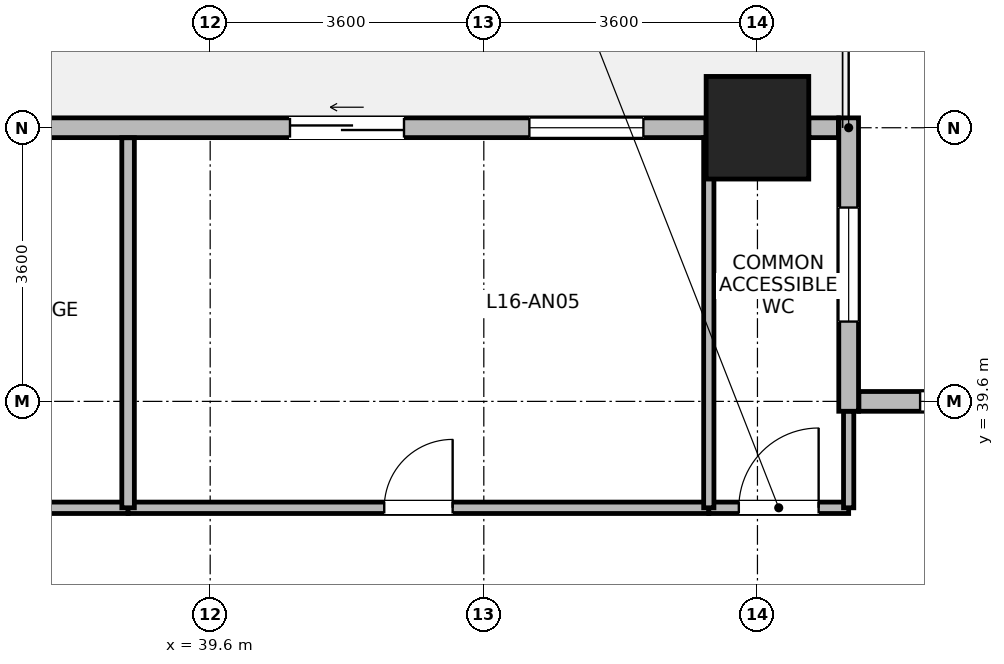
"""IFC4 building model, lengths in metres.
Left out: names, types, materials, properties, quantities, classifications, styles, units other than length and angle.
Written with IfcOpenShell. Run it as: python <this file> out.ifc"""

import sys

from ifc_helpers import new_model, si_unit, direction, frame, frame_2d, origin, origin_2d, place, context, subcontext, project, spatial, rectangle, extrude, source, transform, mapped, element, fill, save


model = new_model("IFC4")
c1 = context("Model", 3, precision=1e-05, world=origin(), true_north=direction((0.0, 1.0)))
c2 = subcontext(c1, "Body", "Model", "MODEL_VIEW")
j1 = project(units=[si_unit("LENGTHUNIT", "METRE"), si_unit("PLANEANGLEUNIT", "RADIAN")], contexts=[c1])
p1 = place(None, origin())
s1 = spatial("IfcSite", under=j1, at=p1, CompositionType="ELEMENT")
p2 = place(p1, origin())
s2 = spatial("IfcBuilding", under=s1, at=p2, CompositionType="ELEMENT")
p3 = place(p2, frame((0.0, 0.0, 66.0)))
s3 = spatial("IfcBuildingStorey", under=s2, at=p3, CompositionType="ELEMENT", Elevation=66.0)
m1 = source(origin(), c2, "Body", "SweptSolid", [
    extrude(rectangle(XDim=1.35, YDim=1.35, at=origin_2d()), origin(), (0.0, 0.0, 1.0), 3.7),
])
p4 = place(p3, frame((46.8, 43.2, 0.0), z_axis=(0.0, 0.0, 1.0), x_axis=(1.0, 0.0, 0.0)))
e1 = element("IfcColumn", 1, at=p4, inside=s3, PredefinedType="COLUMN", context=c2, shape_type="MappedRepresentation", body=[
    mapped(m1, transform((0.0, 0.0, 0.0), x_axis=(1.0, 0.0, 0.0), y_axis=(0.0, 1.0, 0.0), z_axis=(0.0, 0.0, 1.0), scale=1.0)),
])
p5 = place(p3, frame((48.135, 39.6, 0.0), z_axis=(0.0, 0.0, 1.0), x_axis=(1.0, 0.0, 0.0)))
e2 = element("IfcWall", 2, at=p5, inside=s3, PredefinedType="STANDARD", context=c2, shape_type="SweptSolid", body=[
    extrude(rectangle(XDim=9.33, YDim=0.26, at=frame_2d((4.665, 0.0))), origin(), (0.0, 0.0, 1.0), 3.43),
])
p6 = place(p5, frame((0.805, 0.0, 0.85)))
e3 = element("IfcOpeningElement", 3, at=p6, cuts=e2, PredefinedType="OPENING", context=c2, shape_type="SweptSolid", body=[
    extrude(rectangle(XDim=1.5, YDim=1.85, at=frame_2d((0.75, 0.925))), frame((0.0, 0.14, 0.0), z_axis=(0.0, -1.0, 0.0), x_axis=(1.0, 0.0, 0.0)), (0.0, 0.0, 1.0), 0.28),
])
p7 = place(p5, frame((3.915, 0.0, 0.85)))
e4 = element("IfcOpeningElement", 4, at=p7, cuts=e2, PredefinedType="OPENING", context=c2, shape_type="SweptSolid", body=[
    extrude(rectangle(XDim=1.5, YDim=1.85, at=frame_2d((0.75, 0.925))), frame((0.0, 0.14, 0.0), z_axis=(0.0, -1.0, 0.0), x_axis=(1.0, 0.0, 0.0)), (0.0, 0.0, 1.0), 0.28),
])
p8 = place(p5, frame((7.025, 0.0, 0.85)))
e5 = element("IfcOpeningElement", 5, at=p8, cuts=e2, PredefinedType="OPENING", context=c2, shape_type="SweptSolid", body=[
    extrude(rectangle(XDim=1.5, YDim=1.85, at=frame_2d((0.75, 0.925))), frame((0.0, 0.14, 0.0), z_axis=(0.0, -1.0, 0.0), x_axis=(1.0, 0.0, 0.0)), (0.0, 0.0, 1.0), 0.28),
])
p9 = place(p3, frame((48.0, 43.33, 0.0), z_axis=(0.0, 0.0, 1.0), x_axis=(0.0, -1.0, 0.0)))
e6 = element("IfcWall", 6, at=p9, inside=s3, PredefinedType="STANDARD", context=c2, shape_type="SweptSolid", body=[
    extrude(rectangle(XDim=3.86, YDim=0.26, at=frame_2d((1.93, 0.0))), origin(), (0.0, 0.0, 1.0), 3.43),
])
p10 = place(p9, frame((1.18, 0.0, 0.85)))
e7 = element("IfcOpeningElement", 7, at=p10, cuts=e6, PredefinedType="OPENING", context=c2, shape_type="SweptSolid", body=[
    extrude(rectangle(XDim=1.5, YDim=1.85, at=frame_2d((0.75, 0.925))), frame((0.0, 0.14, 0.0), z_axis=(0.0, -1.0, 0.0), x_axis=(1.0, 0.0, 0.0)), (0.0, 0.0, 1.0), 0.28),
])
p11 = place(p3, frame((47.476, 43.2, 0.0), z_axis=(0.0, 0.0, 1.0), x_axis=(1.0, 0.0, 0.0)))
e8 = element("IfcWall", 8, at=p11, inside=s3, PredefinedType="STANDARD", context=c2, shape_type="SweptSolid", body=[
    extrude(rectangle(XDim=0.389, YDim=0.26, at=frame_2d((0.194, 0.0))), origin(), (0.0, 0.0, 1.0), 3.43),
])
p12 = place(p3, frame((36.676, 43.2, 0.0), z_axis=(0.0, 0.0, 1.0), x_axis=(1.0, 0.0, 0.0)))
e9 = element("IfcWall", 9, at=p12, inside=s3, PredefinedType="STANDARD", context=c2, shape_type="SweptSolid", body=[
    extrude(rectangle(XDim=9.448, YDim=0.26, at=frame_2d((4.724, 0.0))), origin(), (0.0, 0.0, 1.0), 2.93),
])
p13 = place(p12, frame((3.974, 0.0, 0.0)))
e10 = element("IfcOpeningElement", 10, at=p13, cuts=e9, PredefinedType="OPENING", context=c2, shape_type="SweptSolid", body=[
    extrude(rectangle(XDim=1.5, YDim=2.15, at=frame_2d((0.75, 1.075))), frame((0.0, 0.14, 0.0), z_axis=(0.0, -1.0, 0.0), x_axis=(1.0, 0.0, 0.0)), (0.0, 0.0, 1.0), 0.28),
])
p14 = place(p12, frame((7.123, 0.0, 0.85)))
e11 = element("IfcOpeningElement", 11, at=p14, cuts=e9, PredefinedType="OPENING", context=c2, shape_type="SweptSolid", body=[
    extrude(rectangle(XDim=1.5, YDim=1.85, at=frame_2d((0.75, 0.925))), frame((0.0, 0.14, 0.0), z_axis=(0.0, -1.0, 0.0), x_axis=(1.0, 0.0, 0.0)), (0.0, 0.0, 1.0), 0.28),
])
p15 = place(p3, frame((30.22, 38.2, 0.0), z_axis=(0.0, 0.0, 1.0), x_axis=(1.0, 0.0, 0.0)))
e12 = element("IfcWall", 12, at=p15, inside=s3, PredefinedType="PARTITIONING", context=c2, shape_type="SweptSolid", body=[
    extrude(rectangle(XDim=8.3, YDim=0.15, at=frame_2d((4.15, 0.0))), origin(), (0.0, 0.0, 1.0), 3.43),
])
p16 = place(p15, frame((3.5, 0.0, 0.0)))
e13 = element("IfcOpeningElement", 13, at=p16, cuts=e12, PredefinedType="OPENING", context=c2, shape_type="SweptSolid", body=[
    extrude(rectangle(XDim=1.3, YDim=2.12, at=frame_2d((0.65, 1.06))), frame((0.0, 0.085, 0.0), z_axis=(0.0, -1.0, 0.0), x_axis=(1.0, 0.0, 0.0)), (0.0, 0.0, 1.0), 0.17),
])
p17 = place(p3, frame((38.52, 38.2, 0.0), z_axis=(0.0, 0.0, 1.0), x_axis=(1.0, 0.0, 0.0)))
e14 = element("IfcWall", 14, at=p17, inside=s3, PredefinedType="PARTITIONING", context=c2, shape_type="SweptSolid", body=[
    extrude(rectangle(XDim=7.64, YDim=0.15, at=frame_2d((3.82, 0.0))), origin(), (0.0, 0.0, 1.0), 3.43),
])
p18 = place(p17, frame((3.37, 0.0, 0.0)))
e15 = element("IfcOpeningElement", 15, at=p18, cuts=e14, PredefinedType="OPENING", context=c2, shape_type="SweptSolid", body=[
    extrude(rectangle(XDim=0.9, YDim=2.08, at=frame_2d((0.45, 1.04))), frame((0.0, 0.085, 0.0), z_axis=(0.0, -1.0, 0.0), x_axis=(1.0, 0.0, 0.0)), (0.0, 0.0, 1.0), 0.17),
])
p19 = place(p3, frame((46.16, 38.2, 0.0), z_axis=(0.0, 0.0, 1.0), x_axis=(1.0, 0.0, 0.0)))
e16 = element("IfcWall", 16, at=p19, inside=s3, PredefinedType="PARTITIONING", context=c2, shape_type="SweptSolid", body=[
    extrude(rectangle(XDim=1.84, YDim=0.15, at=frame_2d((0.92, 0.0))), origin(), (0.0, 0.0, 1.0), 3.43),
])
p20 = place(p19, frame((0.395, 0.0, 0.0)))
e17 = element("IfcOpeningElement", 17, at=p20, cuts=e16, PredefinedType="OPENING", context=c2, shape_type="SweptSolid", body=[
    extrude(rectangle(XDim=1.05, YDim=2.12, at=frame_2d((0.525, 1.06))), frame((0.0, 0.085, 0.0), z_axis=(0.0, -1.0, 0.0), x_axis=(1.0, 0.0, 0.0)), (0.0, 0.0, 1.0), 0.17),
])
p21 = place(p3, frame((38.52, 38.2, 0.0), z_axis=(0.0, 0.0, 1.0), x_axis=(0.0, 1.0, 0.0)))
e18 = element("IfcWall", 18, at=p21, inside=s3, PredefinedType="PARTITIONING", context=c2, shape_type="SweptSolid", body=[
    extrude(rectangle(XDim=4.868, YDim=0.165, at=frame_2d((2.434, 0.0))), origin(), (0.0, 0.0, 1.0), 3.43),
])
p22 = place(p3, frame((46.16, 38.2, 0.0), z_axis=(0.0, 0.0, 1.0), x_axis=(0.0, 1.0, 0.0)))
e19 = element("IfcWall", 19, at=p22, inside=s3, PredefinedType="PARTITIONING", context=c2, shape_type="SweptSolid", body=[
    extrude(rectangle(XDim=4.868, YDim=0.135, at=frame_2d((2.434, 0.0))), origin(), (0.0, 0.0, 1.0), 3.43),
])
p23 = place(p3, frame((48.0, 38.2, 0.0), z_axis=(0.0, 0.0, 1.0), x_axis=(0.0, 1.0, 0.0)))
e20 = element("IfcWall", 20, at=p23, inside=s3, PredefinedType="PARTITIONING", context=c2, shape_type="SweptSolid", body=[
    extrude(rectangle(XDim=1.268, YDim=0.135, at=frame_2d((0.634, 0.0))), origin(), (0.0, 0.0, 1.0), 3.43),
])
p24 = place(p6, origin())
e21 = element("IfcWindow", 21, at=p24, inside=s3, PartitioningType="SINGLE_PANEL", PredefinedType="WINDOW", context=c2, shape_type="SweptSolid", body=[
    extrude(rectangle(XDim=1.5, YDim=1.85, at=frame_2d((0.75, 0.925))), frame((0.0, 0.03, 0.0), z_axis=(0.0, -1.0, 0.0), x_axis=(1.0, 0.0, 0.0)), (0.0, 0.0, 1.0), 0.06),
])
fill(e3, e21)
p25 = place(p10, origin())
e22 = element("IfcWindow", 22, at=p25, inside=s3, PartitioningType="SINGLE_PANEL", PredefinedType="WINDOW", context=c2, shape_type="SweptSolid", body=[
    extrude(rectangle(XDim=1.5, YDim=1.85, at=frame_2d((0.75, 0.925))), frame((0.0, 0.03, 0.0), z_axis=(0.0, -1.0, 0.0), x_axis=(1.0, 0.0, 0.0)), (0.0, 0.0, 1.0), 0.06),
])
fill(e7, e22)
p26 = place(p13, origin())
e23 = element("IfcDoor", 23, at=p26, inside=s3, OperationType="SLIDING_TO_LEFT", PredefinedType="DOOR", context=c2, shape_type="SweptSolid", body=[
    extrude(rectangle(XDim=1.5, YDim=2.15, at=frame_2d((0.75, 1.075))), frame((0.0, 0.025, 0.0), z_axis=(0.0, -1.0, 0.0), x_axis=(1.0, 0.0, 0.0)), (0.0, 0.0, 1.0), 0.05),
])
fill(e10, e23)
p27 = place(p14, origin())
e24 = element("IfcWindow", 24, at=p27, inside=s3, PartitioningType="SINGLE_PANEL", PredefinedType="WINDOW", context=c2, shape_type="SweptSolid", body=[
    extrude(rectangle(XDim=1.5, YDim=1.85, at=frame_2d((0.75, 0.925))), frame((0.0, 0.03, 0.0), z_axis=(0.0, -1.0, 0.0), x_axis=(1.0, 0.0, 0.0)), (0.0, 0.0, 1.0), 0.06),
])
fill(e11, e24)
p28 = place(p18, origin())
e25 = element("IfcDoor", 25, at=p28, inside=s3, OperationType="SINGLE_SWING_RIGHT", PredefinedType="DOOR", context=c2, shape_type="SweptSolid", body=[
    extrude(rectangle(XDim=0.9, YDim=2.08, at=frame_2d((0.45, 1.04))), frame((0.0, 0.025, 0.0), z_axis=(0.0, -1.0, 0.0), x_axis=(1.0, 0.0, 0.0)), (0.0, 0.0, 1.0), 0.05),
])
fill(e15, e25)
p29 = place(p20, origin())
e26 = element("IfcDoor", 26, at=p29, inside=s3, OperationType="SINGLE_SWING_RIGHT", PredefinedType="DOOR", context=c2, shape_type="SweptSolid", body=[
    extrude(rectangle(XDim=1.05, YDim=2.12, at=frame_2d((0.525, 1.06))), frame((0.0, 0.025, 0.0), z_axis=(0.0, -1.0, 0.0), x_axis=(1.0, 0.0, 0.0)), (0.0, 0.0, 1.0), 0.05),
])
fill(e17, e26)
save(model, sys.argv[1])
